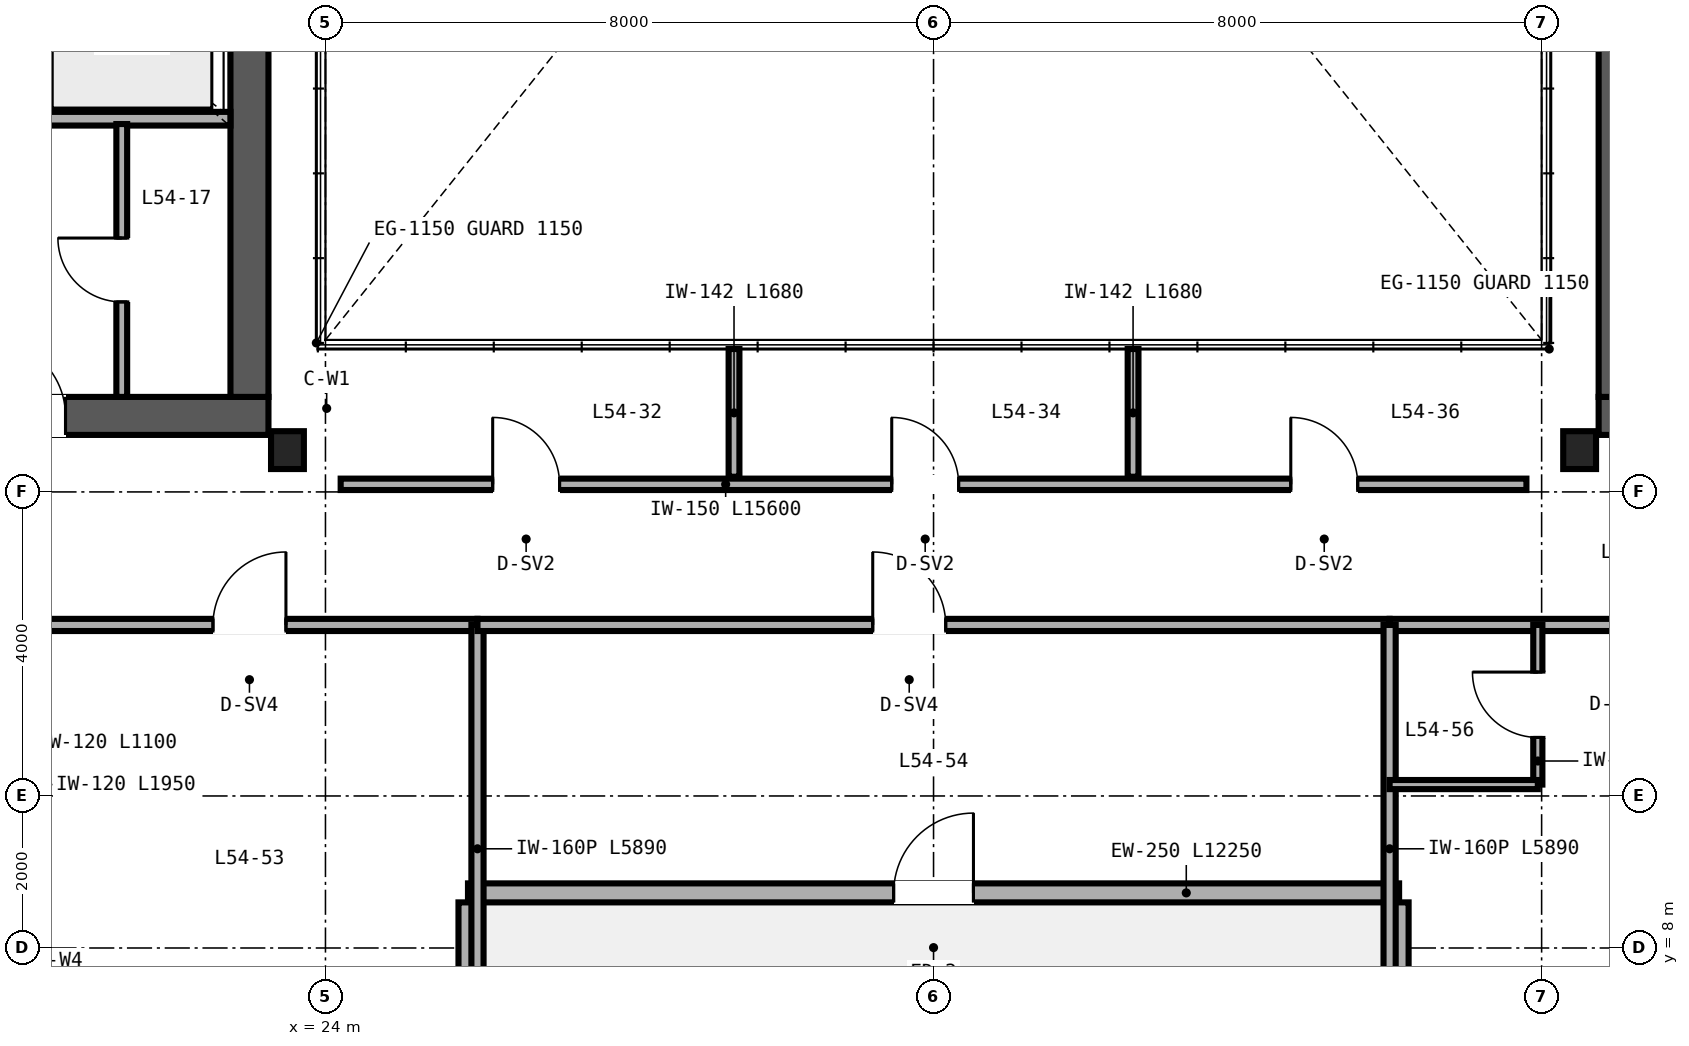
"""IFC4 building model, lengths in metres.
Left out: names, types, materials, properties, quantities, classifications, styles, units other than length and angle.
Written with IfcOpenShell. Run it as: python <this file> out.ifc"""

import sys

from ifc_helpers import new_model, si_unit, direction, frame, frame_2d, origin, origin_2d, place, context, subcontext, project, spatial, rectangle, i_section, extrude, source, transform, mapped, element, fill, save


model = new_model("IFC4")
c1 = context("Model", 3, precision=1e-05, world=origin(), true_north=direction((0.0, 1.0)))
c2 = subcontext(c1, "Body", "Model", "MODEL_VIEW")
j1 = project(units=[si_unit("LENGTHUNIT", "METRE"), si_unit("PLANEANGLEUNIT", "RADIAN")], contexts=[c1])
p1 = place(None, origin())
s1 = spatial("IfcSite", under=j1, at=p1, CompositionType="ELEMENT")
p2 = place(p1, origin())
s2 = spatial("IfcBuilding", under=s1, at=p2, CompositionType="ELEMENT")
p3 = place(p2, frame((0.0, 0.0, 213.6)))
s3 = spatial("IfcBuildingStorey", under=s2, at=p3, CompositionType="ELEMENT", Elevation=213.6)
p4 = place(p3, frame((10.75, 15.0, 0.0), z_axis=(0.0, 0.0, 1.0), x_axis=(1.0, 0.0, 0.0)))
e1 = element("IfcWall", 1, at=p4, inside=s3, PredefinedType="SHEAR", context=c2, shape_type="SweptSolid", body=[
    extrude(rectangle(XDim=12.5, YDim=0.5, at=frame_2d((6.25, 0.0))), origin(), (0.0, 0.0, 1.0), 3.37),
])
p5 = place(p4, frame((8.83, 0.0, 0.0)))
e2 = element("IfcOpeningElement", 2, at=p5, cuts=e1, PredefinedType="OPENING", context=c2, shape_type="SweptSolid", body=[
    extrude(rectangle(XDim=1.0, YDim=2.15, at=frame_2d((0.5, 1.075))), frame((0.0, 0.26, 0.0), z_axis=(0.0, -1.0, 0.0), x_axis=(1.0, 0.0, 0.0)), (0.0, 0.0, 1.0), 0.52),
])
p6 = place(p3, frame((23.0, 15.25, 0.0), z_axis=(0.0, 0.0, 1.0), x_axis=(0.0, 1.0, 0.0)))
e3 = element("IfcWall", 3, at=p6, inside=s3, PredefinedType="SHEAR", context=c2, shape_type="SweptSolid", body=[
    extrude(rectangle(XDim=21.5, YDim=0.5, at=frame_2d((10.75, 0.0))), origin(), (0.0, 0.0, 1.0), 3.37),
])
p7 = place(p3, frame((40.75, 15.0, 0.0), z_axis=(0.0, 0.0, 1.0), x_axis=(1.0, 0.0, 0.0)))
e4 = element("IfcWall", 4, at=p7, inside=s3, PredefinedType="SHEAR", context=c2, shape_type="SweptSolid", body=[
    extrude(rectangle(XDim=12.5, YDim=0.5, at=frame_2d((6.25, 0.0))), origin(), (0.0, 0.0, 1.0), 3.37),
])
p8 = place(p7, frame((4.35, 0.0, 0.0)))
e5 = element("IfcOpeningElement", 5, at=p8, cuts=e4, PredefinedType="OPENING", context=c2, shape_type="SweptSolid", body=[
    extrude(rectangle(XDim=1.0, YDim=2.15, at=frame_2d((0.5, 1.075))), frame((0.0, 0.26, 0.0), z_axis=(0.0, -1.0, 0.0), x_axis=(1.0, 0.0, 0.0)), (0.0, 0.0, 1.0), 0.52),
])
p9 = place(p3, frame((41.0, 15.25, 0.0), z_axis=(0.0, 0.0, 1.0), x_axis=(0.0, 1.0, 0.0)))
e6 = element("IfcWall", 6, at=p9, inside=s3, PredefinedType="SHEAR", context=c2, shape_type="SweptSolid", body=[
    extrude(rectangle(XDim=21.5, YDim=0.5, at=frame_2d((10.75, 0.0))), origin(), (0.0, 0.0, 1.0), 3.37),
])
m1 = source(origin(), c2, "Body", "SweptSolid", [
    extrude(i_section(OverallWidth=0.432, OverallDepth=0.498, WebThickness=0.056, FlangeThickness=0.089, FilletRadius=0.025, at=origin_2d()), origin(), (0.0, 0.0, 1.0), 3.37),
])
for number, where, z_axis, x_axis in (
    (7, (23.5, 14.55, 0.0), (0.0, 0.0, 1.0), (1.0, 0.0, 0.0)),
    (8, (40.5, 14.55, 0.0), (0.0, 0.0, 1.0), (1.0, 0.0, 0.0)),
):
    element("IfcColumn", number, at=place(p3, frame(where, z_axis=z_axis, x_axis=x_axis)), inside=s3, PredefinedType="COLUMN", context=c2, shape_type="MappedRepresentation", body=[
        mapped(m1, transform((0.0, 0.0, 0.0), scale=1.0)),
    ])
p10 = place(p3, frame((25.875, 8.725, 0.0), z_axis=(0.0, 0.0, 1.0), x_axis=(1.0, 0.0, 0.0)))
e9 = element("IfcWall", 9, at=p10, inside=s3, PredefinedType="SOLIDWALL", context=c2, shape_type="SweptSolid", body=[
    extrude(rectangle(XDim=12.25, YDim=0.25, at=frame_2d((6.125, 0.0))), origin(), (0.0, 0.0, 1.0), 3.37),
])
p11 = place(p10, frame((5.6, 0.0, 0.0)))
e10 = element("IfcOpeningElement", 10, at=p11, cuts=e9, PredefinedType="OPENING", context=c2, shape_type="SweptSolid", body=[
    extrude(rectangle(XDim=1.05, YDim=2.15, at=frame_2d((0.525, 1.075))), frame((0.0, 0.135, 0.0), z_axis=(0.0, -1.0, 0.0), x_axis=(1.0, 0.0, 0.0)), (0.0, 0.0, 1.0), 0.27),
])
for number, where, z_axis, x_axis in (
    (11, (25.875, 6.1, 0.0), (0.0, 0.0, 1.0), (0.0, 1.0, 0.0)),
    (12, (38.125, 6.1, 0.0), (0.0, 0.0, 1.0), (0.0, 1.0, 0.0)),
):
    element("IfcWall", number, at=place(p3, frame(where, z_axis=z_axis, x_axis=x_axis)), inside=s3, PredefinedType="SOLIDWALL", context=c2, shape_type="SweptSolid", body=[
        extrude(rectangle(XDim=2.5, YDim=0.25, at=frame_2d((1.25, 0.0))), origin(), (0.0, 0.0, 1.0), 2.443),
    ])
p12 = place(p3, frame((20.12, 18.91, 0.0), z_axis=(0.0, 0.0, 1.0), x_axis=(1.0, 0.0, 0.0)))
e13 = element("IfcWall", 13, at=p12, inside=s3, PredefinedType="SOLIDWALL", context=c2, shape_type="SweptSolid", body=[
    extrude(rectangle(XDim=2.63, YDim=0.18, at=frame_2d((1.315, 0.0))), origin(), (0.0, 0.0, 1.0), 3.37),
])
p13 = place(p3, frame((21.32, 15.25, 0.0), z_axis=(0.0, 0.0, 1.0), x_axis=(0.0, 1.0, 0.0)))
e14 = element("IfcWall", 14, at=p13, inside=s3, PredefinedType="PARTITIONING", context=c2, shape_type="SweptSolid", body=[
    extrude(rectangle(XDim=3.59, YDim=0.142, at=frame_2d((1.795, 0.0))), origin(), (0.0, 0.0, 1.0), 3.37),
])
p14 = place(p13, frame((1.25, 0.0, 0.0)))
e15 = element("IfcOpeningElement", 15, at=p14, cuts=e14, PredefinedType="OPENING", context=c2, shape_type="SweptSolid", body=[
    extrude(rectangle(XDim=0.84, YDim=2.1, at=frame_2d((0.42, 1.05))), frame((0.0, 0.081, 0.0), z_axis=(0.0, -1.0, 0.0), x_axis=(1.0, 0.0, 0.0)), (0.0, 0.0, 1.0), 0.162),
])
p15 = place(p3, frame((24.2, 14.1, 0.0), z_axis=(0.0, 0.0, 1.0), x_axis=(1.0, 0.0, 0.0)))
e16 = element("IfcWall", 16, at=p15, inside=s3, PredefinedType="PARTITIONING", context=c2, shape_type="SweptSolid", body=[
    extrude(rectangle(XDim=15.6, YDim=0.15, at=frame_2d((7.8, 0.0))), origin(), (0.0, 0.0, 1.0), 3.37),
])
p16 = place(p15, frame((2.0, 0.0, 0.0)))
e17 = element("IfcOpeningElement", 17, at=p16, cuts=e16, PredefinedType="OPENING", context=c2, shape_type="SweptSolid", body=[
    extrude(rectangle(XDim=0.88, YDim=2.15, at=frame_2d((0.44, 1.075))), frame((0.0, 0.085, 0.0), z_axis=(0.0, -1.0, 0.0), x_axis=(1.0, 0.0, 0.0)), (0.0, 0.0, 1.0), 0.17),
])
p17 = place(p15, frame((7.25, 0.0, 0.0)))
e18 = element("IfcOpeningElement", 18, at=p17, cuts=e16, PredefinedType="OPENING", context=c2, shape_type="SweptSolid", body=[
    extrude(rectangle(XDim=0.88, YDim=2.15, at=frame_2d((0.44, 1.075))), frame((0.0, 0.085, 0.0), z_axis=(0.0, -1.0, 0.0), x_axis=(1.0, 0.0, 0.0)), (0.0, 0.0, 1.0), 0.17),
])
p18 = place(p15, frame((12.5, 0.0, 0.0)))
e19 = element("IfcOpeningElement", 19, at=p18, cuts=e16, PredefinedType="OPENING", context=c2, shape_type="SweptSolid", body=[
    extrude(rectangle(XDim=0.88, YDim=2.15, at=frame_2d((0.44, 1.075))), frame((0.0, 0.085, 0.0), z_axis=(0.0, -1.0, 0.0), x_axis=(1.0, 0.0, 0.0)), (0.0, 0.0, 1.0), 0.17),
])
for number, where, z_axis, x_axis in (
    (20, (29.375, 14.2, 0.0), (0.0, 0.0, 1.0), (0.0, 1.0, 0.0)),
    (21, (34.625, 14.2, 0.0), (0.0, 0.0, 1.0), (0.0, 1.0, 0.0)),
):
    element("IfcWall", number, at=place(p3, frame(where, z_axis=z_axis, x_axis=x_axis)), inside=s3, PredefinedType="PARTITIONING", context=c2, shape_type="SweptSolid", body=[
        extrude(rectangle(XDim=1.68, YDim=0.142, at=frame_2d((0.84, 0.0))), origin(), (0.0, 0.0, 1.0), 3.37),
    ])
p19 = place(p3, frame((14.0, 12.25, 0.0), z_axis=(0.0, 0.0, 1.0), x_axis=(1.0, 0.0, 0.0)))
e22 = element("IfcWall", 22, at=p19, inside=s3, PredefinedType="PARTITIONING", context=c2, shape_type="SweptSolid", body=[
    extrude(rectangle(XDim=12.0, YDim=0.16, at=frame_2d((6.0, 0.0))), origin(), (0.0, 0.0, 1.0), 2.913),
])
p20 = place(p19, frame((4.74, 0.0, 0.0)))
e23 = element("IfcOpeningElement", 23, at=p20, cuts=e22, PredefinedType="OPENING", context=c2, shape_type="SweptSolid", body=[
    extrude(rectangle(XDim=0.94, YDim=2.15, at=frame_2d((0.47, 1.075))), frame((0.0, 0.09, 0.0), z_axis=(0.0, -1.0, 0.0), x_axis=(1.0, 0.0, 0.0)), (0.0, 0.0, 1.0), 0.18),
])
p21 = place(p19, frame((8.52, 0.0, 0.0)))
e24 = element("IfcOpeningElement", 24, at=p21, cuts=e22, PredefinedType="OPENING", context=c2, shape_type="SweptSolid", body=[
    extrude(rectangle(XDim=0.96, YDim=2.15, at=frame_2d((0.48, 1.075))), frame((0.0, 0.09, 0.0), z_axis=(0.0, -1.0, 0.0), x_axis=(1.0, 0.0, 0.0)), (0.0, 0.0, 1.0), 0.18),
])
p22 = place(p3, frame((26.0, 6.36, 0.0), z_axis=(0.0, 0.0, 1.0), x_axis=(0.0, 1.0, 0.0)))
e25 = element("IfcWall", 25, at=p22, inside=s3, PredefinedType="PARTITIONING", context=c2, shape_type="SweptSolid", body=[
    extrude(rectangle(XDim=5.89, YDim=0.16, at=frame_2d((2.945, 0.0))), origin(), (0.0, 0.0, 1.0), 2.443),
])
p23 = place(p3, frame((26.0, 12.25, 0.0), z_axis=(0.0, 0.0, 1.0), x_axis=(1.0, 0.0, 0.0)))
e26 = element("IfcWall", 26, at=p23, inside=s3, PredefinedType="PARTITIONING", context=c2, shape_type="SweptSolid", body=[
    extrude(rectangle(XDim=12.0, YDim=0.16, at=frame_2d((6.0, 0.0))), origin(), (0.0, 0.0, 1.0), 3.37),
])
p24 = place(p23, frame((5.2, 0.0, 0.0)))
e27 = element("IfcOpeningElement", 27, at=p24, cuts=e26, PredefinedType="OPENING", context=c2, shape_type="SweptSolid", body=[
    extrude(rectangle(XDim=0.96, YDim=2.15, at=frame_2d((0.48, 1.075))), frame((0.0, 0.09, 0.0), z_axis=(0.0, -1.0, 0.0), x_axis=(1.0, 0.0, 0.0)), (0.0, 0.0, 1.0), 0.18),
])
p25 = place(p3, frame((38.0, 12.25, 0.0), z_axis=(0.0, 0.0, 1.0), x_axis=(1.0, 0.0, 0.0)))
e28 = element("IfcWall", 28, at=p25, inside=s3, PredefinedType="PARTITIONING", context=c2, shape_type="SweptSolid", body=[
    extrude(rectangle(XDim=12.0, YDim=0.16, at=frame_2d((6.0, 0.0))), origin(), (0.0, 0.0, 1.0), 2.913),
])
p26 = place(p25, frame((5.24, 0.0, 0.0)))
e29 = element("IfcOpeningElement", 29, at=p26, cuts=e28, PredefinedType="OPENING", context=c2, shape_type="SweptSolid", body=[
    extrude(rectangle(XDim=0.94, YDim=2.15, at=frame_2d((0.47, 1.075))), frame((0.0, 0.09, 0.0), z_axis=(0.0, -1.0, 0.0), x_axis=(1.0, 0.0, 0.0)), (0.0, 0.0, 1.0), 0.18),
])
p27 = place(p25, frame((10.74, 0.0, 0.0)))
e30 = element("IfcOpeningElement", 30, at=p27, cuts=e28, PredefinedType="OPENING", context=c2, shape_type="SweptSolid", body=[
    extrude(rectangle(XDim=0.94, YDim=2.15, at=frame_2d((0.47, 1.075))), frame((0.0, 0.09, 0.0), z_axis=(0.0, -1.0, 0.0), x_axis=(1.0, 0.0, 0.0)), (0.0, 0.0, 1.0), 0.18),
])
p28 = place(p3, frame((38.0, 6.36, 0.0), z_axis=(0.0, 0.0, 1.0), x_axis=(0.0, 1.0, 0.0)))
e31 = element("IfcWall", 31, at=p28, inside=s3, PredefinedType="PARTITIONING", context=c2, shape_type="SweptSolid", body=[
    extrude(rectangle(XDim=5.89, YDim=0.16, at=frame_2d((2.945, 0.0))), origin(), (0.0, 0.0, 1.0), 2.443),
])
p29 = place(p3, frame((39.95, 10.15, 0.0), z_axis=(0.0, 0.0, 1.0), x_axis=(0.0, 1.0, 0.0)))
e32 = element("IfcWall", 32, at=p29, inside=s3, PredefinedType="PARTITIONING", context=c2, shape_type="SweptSolid", body=[
    extrude(rectangle(XDim=2.1, YDim=0.12, at=frame_2d((1.05, 0.0))), origin(), (0.0, 0.0, 1.0), 3.37),
])
p30 = place(p29, frame((0.62, 0.0, 0.0)))
e33 = element("IfcOpeningElement", 33, at=p30, cuts=e32, PredefinedType="OPENING", context=c2, shape_type="SweptSolid", body=[
    extrude(rectangle(XDim=0.86, YDim=2.1, at=frame_2d((0.43, 1.05))), frame((0.0, 0.07, 0.0), z_axis=(0.0, -1.0, 0.0), x_axis=(1.0, 0.0, 0.0)), (0.0, 0.0, 1.0), 0.14),
])
p31 = place(p3, frame((38.0, 10.15, 0.0), z_axis=(0.0, 0.0, 1.0), x_axis=(1.0, 0.0, 0.0)))
e34 = element("IfcWall", 34, at=p31, inside=s3, PredefinedType="PARTITIONING", context=c2, shape_type="SweptSolid", body=[
    extrude(rectangle(XDim=1.95, YDim=0.12, at=frame_2d((0.975, 0.0))), origin(), (0.0, 0.0, 1.0), 3.37),
])
m2 = source(origin(), c2, "Body", "SweptSolid", [
    extrude(rectangle(XDim=1.05, YDim=2.15, at=frame_2d((0.525, 1.075))), frame((0.0, 0.025, 0.0), z_axis=(0.0, -1.0, 0.0), x_axis=(1.0, 0.0, 0.0)), (0.0, 0.0, 1.0), 0.05),
])
p32 = place(p11, origin())
e35 = element("IfcDoor", 35, at=p32, inside=s3, OperationType="SINGLE_SWING_RIGHT", PredefinedType="DOOR", context=c2, shape_type="MappedRepresentation", body=[
    mapped(m2, transform((0.0, 0.0, 0.0), scale=1.0)),
])
fill(e10, e35)
m3 = source(origin(), c2, "Body", "SweptSolid", [
    extrude(rectangle(XDim=0.84, YDim=2.1, at=frame_2d((0.42, 1.05))), frame((0.0, 0.025, 0.0), z_axis=(0.0, -1.0, 0.0), x_axis=(1.0, 0.0, 0.0)), (0.0, 0.0, 1.0), 0.05),
])
p33 = place(p14, origin())
e36 = element("IfcDoor", 36, at=p33, inside=s3, OperationType="SINGLE_SWING_RIGHT", PredefinedType="DOOR", context=c2, shape_type="MappedRepresentation", body=[
    mapped(m3, transform((0.0, 0.0, 0.0), scale=1.0)),
])
fill(e15, e36)
m4 = source(origin(), c2, "Body", "SweptSolid", [
    extrude(rectangle(XDim=1.0, YDim=2.15, at=frame_2d((0.5, 1.075))), frame((0.0, 0.025, 0.0), z_axis=(0.0, -1.0, 0.0), x_axis=(1.0, 0.0, 0.0)), (0.0, 0.0, 1.0), 0.05),
])
p34 = place(p5, origin())
e37 = element("IfcDoor", 37, at=p34, inside=s3, OperationType="SINGLE_SWING_LEFT", PredefinedType="DOOR", context=c2, shape_type="MappedRepresentation", body=[
    mapped(m4, transform((0.0, 0.0, 0.0), scale=1.0)),
])
fill(e2, e37)
m5 = source(origin(), c2, "Body", "SweptSolid", [
    extrude(rectangle(XDim=0.88, YDim=2.15, at=frame_2d((0.44, 1.075))), frame((0.0, 0.025, 0.0), z_axis=(0.0, -1.0, 0.0), x_axis=(1.0, 0.0, 0.0)), (0.0, 0.0, 1.0), 0.05),
])
p35 = place(p16, origin())
e38 = element("IfcDoor", 38, at=p35, inside=s3, OperationType="SINGLE_SWING_LEFT", PredefinedType="DOOR", context=c2, shape_type="MappedRepresentation", body=[
    mapped(m5, transform((0.0, 0.0, 0.0), scale=1.0)),
])
fill(e17, e38)
p36 = place(p17, origin())
e39 = element("IfcDoor", 39, at=p36, inside=s3, OperationType="SINGLE_SWING_LEFT", PredefinedType="DOOR", context=c2, shape_type="MappedRepresentation", body=[
    mapped(m5, transform((0.0, 0.0, 0.0), scale=1.0)),
])
fill(e18, e39)
p37 = place(p18, origin())
e40 = element("IfcDoor", 40, at=p37, inside=s3, OperationType="SINGLE_SWING_LEFT", PredefinedType="DOOR", context=c2, shape_type="MappedRepresentation", body=[
    mapped(m5, transform((0.0, 0.0, 0.0), scale=1.0)),
])
fill(e19, e40)
m6 = source(origin(), c2, "Body", "SweptSolid", [
    extrude(rectangle(XDim=0.96, YDim=2.15, at=frame_2d((0.48, 1.075))), frame((0.0, 0.025, 0.0), z_axis=(0.0, -1.0, 0.0), x_axis=(1.0, 0.0, 0.0)), (0.0, 0.0, 1.0), 0.05),
])
p38 = place(p21, origin())
e41 = element("IfcDoor", 41, at=p38, inside=s3, OperationType="SINGLE_SWING_RIGHT", PredefinedType="DOOR", context=c2, shape_type="MappedRepresentation", body=[
    mapped(m6, transform((0.0, 0.0, 0.0), scale=1.0)),
])
fill(e24, e41)
p39 = place(p24, origin())
e42 = element("IfcDoor", 42, at=p39, inside=s3, OperationType="SINGLE_SWING_LEFT", PredefinedType="DOOR", context=c2, shape_type="MappedRepresentation", body=[
    mapped(m6, transform((0.0, 0.0, 0.0), scale=1.0)),
])
fill(e27, e42)
m7 = source(origin(), c2, "Body", "SweptSolid", [
    extrude(rectangle(XDim=0.86, YDim=2.1, at=frame_2d((0.43, 1.05))), frame((0.0, 0.025, 0.0), z_axis=(0.0, -1.0, 0.0), x_axis=(1.0, 0.0, 0.0)), (0.0, 0.0, 1.0), 0.05),
])
p40 = place(p30, origin())
e43 = element("IfcDoor", 43, at=p40, inside=s3, OperationType="SINGLE_SWING_RIGHT", PredefinedType="DOOR", context=c2, shape_type="MappedRepresentation", body=[
    mapped(m7, transform((0.0, 0.0, 0.0), scale=1.0)),
])
fill(e33, e43)
save(model, sys.argv[1])
